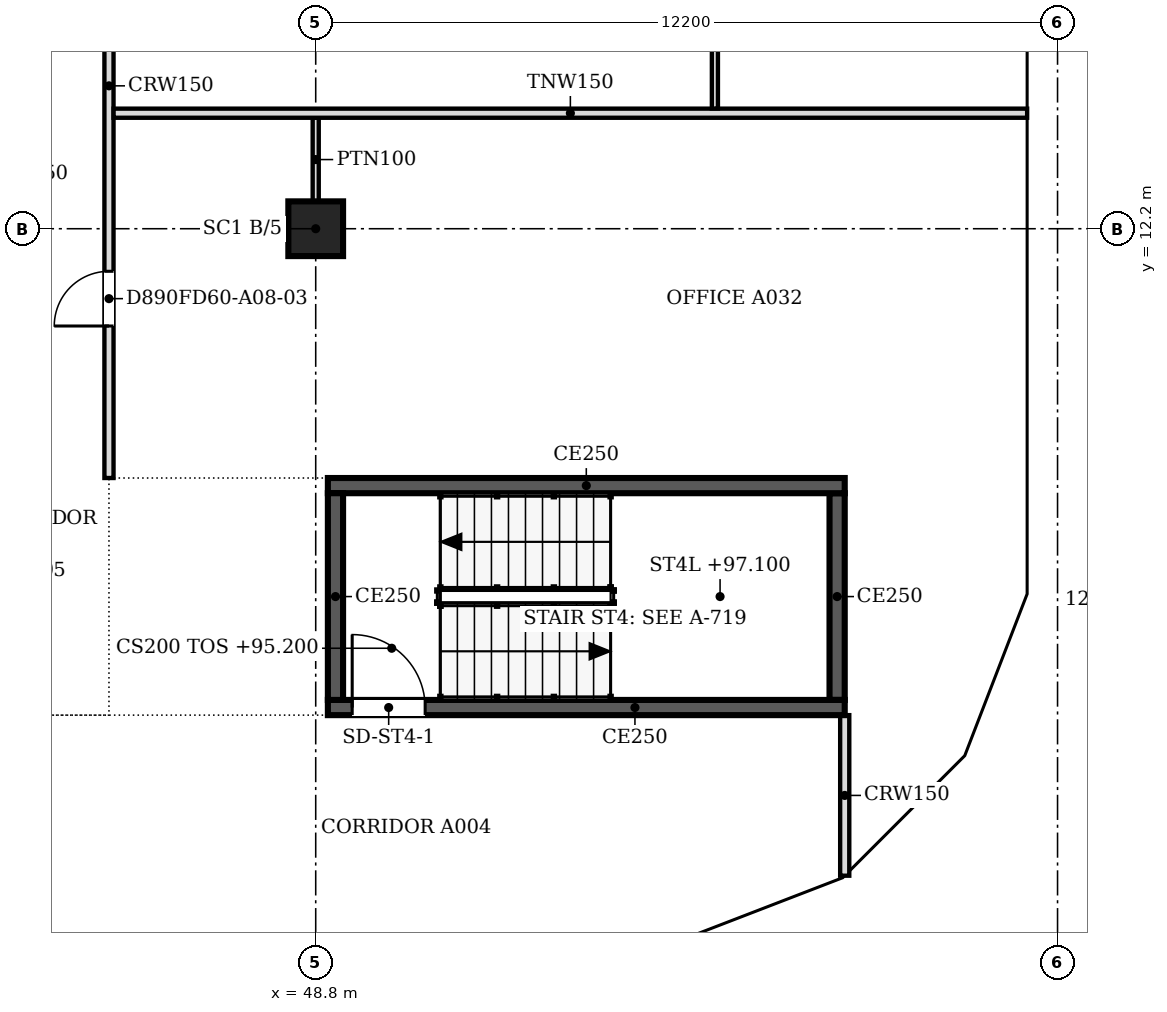
"""IFC4 building model, lengths in metres.
Left out: names, types, materials, properties, quantities, classifications, styles, units other than length and angle.
Written with IfcOpenShell. Run it as: python <this file> out.ifc"""

import sys

from ifc_helpers import new_model, si_unit, direction, frame, frame_2d, origin, origin_2d, place, context, subcontext, project, spatial, polyline, rectangle, outline, extrude, faceted_brep, source, transform, mapped, element, fill, save


model = new_model("IFC4")
c1 = context("Model", 3, precision=1e-05, world=origin(), true_north=direction((0.0, 1.0)))
c2 = subcontext(c1, "Body", "Model", "MODEL_VIEW")
j1 = project(units=[si_unit("LENGTHUNIT", "METRE"), si_unit("PLANEANGLEUNIT", "RADIAN")], contexts=[c1])
p1 = place(None, origin())
s1 = spatial("IfcSite", under=j1, at=p1, CompositionType="ELEMENT")
p2 = place(p1, origin())
s2 = spatial("IfcBuilding", under=s1, at=p2, CompositionType="ELEMENT")
p3 = place(p2, frame((0.0, 0.0, 95.2)))
s3 = spatial("IfcBuildingStorey", under=s2, at=p3, CompositionType="ELEMENT", Elevation=95.2)
p4 = place(p3, frame((48.8, 12.2, 0.0), z_axis=(0.0, 0.0, 1.0), x_axis=(1.0, 0.0, 0.0)))
e1 = element("IfcColumn", 1, at=p4, inside=s3, PredefinedType="COLUMN", context=c2, shape_type="SweptSolid", body=[
    extrude(rectangle(XDim=0.9, YDim=0.9, at=origin_2d()), origin(), (0.0, 0.0, 1.0), 3.6),
])
m1 = source(origin(), c2, "Body", "Brep", [
    faceted_brep([(2.95, -0.25, 0.0), (3.003, -0.25, 0.068), (3.003, -0.25, 7.532), (2.95, -0.25, 7.6), (0.0, -0.25, 3.8), (0.047, 0.25, 3.86), (2.898, 0.25, 7.532), (2.898, 0.25, 0.068), (0.047, 0.25, 3.74), (2.95, 0.0, 0.0), (2.95, 0.0, 7.6), (0.0, 0.0, 3.8)], [[[0, 1, 2, 3, 4]], [[5, 6, 7, 8]], [[1, 0, 9]], [[10, 3, 2]], [[6, 5, 11, 4, 3, 10]], [[8, 7, 9, 0, 4, 11]], [[8, 11, 5]], [[1, 9, 7, 6, 10, 2]]]),
])
p5 = place(p3, frame((54.854, 0.25, -3.8), z_axis=(0.0, 0.0, 1.0), x_axis=(0.932970071518, 0.359953949349, 0.0)))
e2 = element("IfcWall", 2, at=p5, inside=s3, PredefinedType="SOLIDWALL", context=c2, shape_type="MappedRepresentation", body=[
    mapped(m1, transform((0.0, 0.0, 0.0), scale=1.0)),
])
m2 = source(origin(), c2, "Body", "SweptSolid", [
    extrude(outline(polyline([(2.75, 6.935), (0.316, 3.8), (2.75, 0.665), (2.75, 6.935)])), frame((0.0, 0.26, 0.0), z_axis=(0.0, -1.0, 0.0), x_axis=(1.0, 0.0, 0.0)), (0.0, 0.0, 1.0), 0.52),
])
p6 = place(p5, origin())
e3 = element("IfcOpeningElement", 3, at=p6, cuts=e2, PredefinedType="OPENING", context=c2, shape_type="MappedRepresentation", body=[
    mapped(m2, transform((0.0, 0.0, 0.0), scale=1.0)),
])
m3 = source(origin(), c2, "Body", "Brep", [
    faceted_brep([(0.053, -0.25, 0.0), (2.997, -0.25, 3.8), (0.053, -0.25, 7.6), (0.0, -0.25, 7.532), (0.0, -0.25, 0.068), (0.106, 0.25, 7.532), (2.944, 0.25, 3.868), (2.944, 0.25, 3.732), (0.106, 0.25, 0.068), (2.997, 0.0, 3.8), (0.053, 0.0, 0.0), (0.053, 0.0, 7.6)], [[[0, 1, 2, 3, 4]], [[5, 6, 7, 8]], [[8, 7, 9, 1, 0, 10]], [[6, 5, 11, 2, 1, 9]], [[3, 2, 11]], [[10, 0, 4]], [[8, 10, 4, 3, 11, 5]], [[9, 7, 6]]]),
])
p7 = place(p3, frame((57.569, 1.274, -3.8), z_axis=(0.0, 0.0, 1.0), x_axis=(0.707066050402, 0.707147509625, 0.0)))
e4 = element("IfcWall", 4, at=p7, inside=s3, PredefinedType="SOLIDWALL", context=c2, shape_type="MappedRepresentation", body=[
    mapped(m3, transform((0.0, 0.0, 0.0), scale=1.0)),
])
m4 = source(origin(), c2, "Body", "SweptSolid", [
    extrude(outline(polyline([(0.253, 0.667), (2.681, 3.8), (0.253, 6.934), (0.253, 0.667)])), frame((0.0, 0.26, 0.0), z_axis=(0.0, -1.0, 0.0), x_axis=(1.0, 0.0, 0.0)), (0.0, 0.0, 1.0), 0.52),
])
p8 = place(p7, origin())
e5 = element("IfcOpeningElement", 5, at=p8, cuts=e4, PredefinedType="OPENING", context=c2, shape_type="MappedRepresentation", body=[
    mapped(m4, transform((0.0, 0.0, 0.0), scale=1.0)),
])
m5 = source(origin(), c2, "Body", "Brep", [
    faceted_brep([(2.95, -0.25, 0.0), (2.997, -0.25, 0.059), (2.997, -0.25, 7.541), (2.95, -0.25, 7.6), (0.0, -0.25, 3.8), (0.053, 0.25, 3.868), (2.904, 0.25, 7.54), (2.904, 0.25, 0.06), (0.053, 0.25, 3.732), (2.95, 0.0, 0.0), (2.95, 0.0, 7.6), (0.0, 0.0, 3.8)], [[[0, 1, 2, 3, 4]], [[5, 6, 7, 8]], [[1, 0, 9]], [[10, 3, 2]], [[6, 5, 11, 4, 3, 10]], [[8, 7, 9, 0, 4, 11]], [[8, 11, 5]], [[1, 9, 7, 6, 10, 2]]]),
])
p9 = place(p3, frame((59.688, 3.394, -3.8), z_axis=(0.0, 0.0, 1.0), x_axis=(0.359972353723, 0.932962970624, 0.0)))
e6 = element("IfcWall", 6, at=p9, inside=s3, PredefinedType="SOLIDWALL", context=c2, shape_type="MappedRepresentation", body=[
    mapped(m5, transform((0.0, 0.0, 0.0), scale=1.0)),
])
p10 = place(p9, origin())
e7 = element("IfcOpeningElement", 7, at=p10, cuts=e6, PredefinedType="OPENING", context=c2, shape_type="MappedRepresentation", body=[
    mapped(m2, transform((0.0, 0.0, 0.0), scale=1.0)),
])
m6 = source(origin(), c2, "Body", "Brep", [
    faceted_brep([(0.047, -0.25, 0.0), (3.05, -0.25, 3.8), (0.047, -0.25, 7.6), (0.0, -0.25, 7.54), (0.0, -0.25, 0.06), (0.093, 0.25, 7.541), (3.05, 0.25, 3.8), (0.093, 0.25, 0.059), (0.047, 0.0, 0.0), (0.047, 0.0, 7.6)], [[[0, 1, 2, 3, 4]], [[5, 6, 7]], [[7, 6, 1, 0, 8]], [[6, 5, 9, 2, 1]], [[3, 2, 9]], [[8, 0, 4]], [[7, 8, 4, 3, 9, 5]]]),
])
p11 = place(p3, frame((60.75, 6.1, -3.8), z_axis=(0.0, 0.0, 1.0), x_axis=(0.0, 1.0, 0.0)))
e8 = element("IfcWall", 8, at=p11, inside=s3, PredefinedType="SOLIDWALL", context=c2, shape_type="MappedRepresentation", body=[
    mapped(m6, transform((0.0, 0.0, 0.0), scale=1.0)),
])
m7 = source(origin(), c2, "Body", "SweptSolid", [
    extrude(outline(polyline([(0.247, 0.656), (2.731, 3.8), (0.247, 6.944), (0.247, 0.656)])), frame((0.0, 0.26, 0.0), z_axis=(0.0, -1.0, 0.0), x_axis=(1.0, 0.0, 0.0)), (0.0, 0.0, 1.0), 0.52),
])
p12 = place(p11, origin())
e9 = element("IfcOpeningElement", 9, at=p12, cuts=e8, PredefinedType="OPENING", context=c2, shape_type="MappedRepresentation", body=[
    mapped(m7, transform((0.0, 0.0, 0.0), scale=1.0)),
])
m8 = source(origin(), c2, "Body", "SweptSolid", [
    extrude(outline(polyline([(3.05, 0.0), (6.1, 3.8), (3.05, 7.6), (0.0, 3.8), (3.05, 0.0)])), frame((0.0, 0.25, 0.0), z_axis=(0.0, -1.0, 0.0), x_axis=(1.0, 0.0, 0.0)), (0.0, 0.0, 1.0), 0.5),
])
p13 = place(p3, frame((60.75, 9.15, -3.8), z_axis=(0.0, 0.0, 1.0), x_axis=(0.0, 1.0, 0.0)))
e10 = element("IfcWall", 10, at=p13, inside=s3, PredefinedType="SOLIDWALL", context=c2, shape_type="MappedRepresentation", body=[
    mapped(m8, transform((0.0, 0.0, 0.0), scale=1.0)),
])
m9 = source(origin(), c2, "Body", "SweptSolid", [
    extrude(outline(polyline([(3.05, 0.399), (5.78, 3.8), (3.05, 7.201), (0.321, 3.8), (3.05, 0.399)])), frame((0.0, 0.26, 0.0), z_axis=(0.0, -1.0, 0.0), x_axis=(1.0, 0.0, 0.0)), (0.0, 0.0, 1.0), 0.52),
])
p14 = place(p13, origin())
e11 = element("IfcOpeningElement", 11, at=p14, cuts=e10, PredefinedType="OPENING", context=c2, shape_type="MappedRepresentation", body=[
    mapped(m9, transform((0.0, 0.0, 0.0), scale=1.0)),
])
p15 = place(p2, frame((0.0, 0.0, 99.0)))
s4 = spatial("IfcBuildingStorey", under=s2, at=p15, CompositionType="ELEMENT", Elevation=99.0)
m10 = source(origin(), c2, "Body", "Brep", [
    faceted_brep([(0.047, -0.25, 0.0), (2.997, -0.25, 3.8), (0.047, -0.25, 7.6), (0.0, -0.25, 7.541), (0.0, -0.25, 0.059), (0.093, 0.25, 7.54), (2.944, 0.25, 3.868), (2.944, 0.25, 3.732), (0.093, 0.25, 0.06), (2.997, 0.0, 3.8), (0.047, 0.0, 0.0), (0.047, 0.0, 7.6)], [[[0, 1, 2, 3, 4]], [[5, 6, 7, 8]], [[8, 7, 9, 1, 0, 10]], [[6, 5, 11, 2, 1, 9]], [[3, 2, 11]], [[10, 0, 4]], [[8, 10, 4, 3, 11, 5]], [[9, 7, 6]]]),
])
p16 = place(p15, frame((54.81, 0.233, -3.8), z_axis=(0.0, 0.0, 1.0), x_axis=(0.932990326376, 0.359901446078, 0.0)))
e12 = element("IfcWall", 12, at=p16, inside=s4, PredefinedType="SOLIDWALL", context=c2, shape_type="MappedRepresentation", body=[
    mapped(m10, transform((0.0, 0.0, 0.0), scale=1.0)),
])
m11 = source(origin(), c2, "Body", "SweptSolid", [
    extrude(outline(polyline([(0.247, 0.665), (2.681, 3.8), (0.247, 6.935), (0.247, 0.665)])), frame((0.0, 0.26, 0.0), z_axis=(0.0, -1.0, 0.0), x_axis=(1.0, 0.0, 0.0)), (0.0, 0.0, 1.0), 0.52),
])
p17 = place(p16, origin())
e13 = element("IfcOpeningElement", 13, at=p17, cuts=e12, PredefinedType="OPENING", context=c2, shape_type="MappedRepresentation", body=[
    mapped(m11, transform((0.0, 0.0, 0.0), scale=1.0)),
])
m12 = source(origin(), c2, "Body", "Brep", [
    faceted_brep([(2.944, -0.25, 0.0), (2.997, -0.25, 0.068), (2.997, -0.25, 7.532), (2.944, -0.25, 7.6), (0.0, -0.25, 3.8), (0.053, 0.25, 3.868), (2.891, 0.25, 7.532), (2.891, 0.25, 0.068), (0.053, 0.25, 3.732), (2.944, 0.0, 0.0), (2.944, 0.0, 7.6), (0.0, 0.0, 3.8)], [[[0, 1, 2, 3, 4]], [[5, 6, 7, 8]], [[1, 0, 9]], [[10, 3, 2]], [[6, 5, 11, 4, 3, 10]], [[8, 7, 9, 0, 4, 11]], [[8, 11, 5]], [[1, 9, 7, 6, 10, 2]]]),
])
p18 = place(p15, frame((57.606, 1.312, -3.8), z_axis=(0.0, 0.0, 1.0), x_axis=(0.707147509625, 0.707066050402, 0.0)))
e14 = element("IfcWall", 14, at=p18, inside=s4, PredefinedType="SOLIDWALL", context=c2, shape_type="MappedRepresentation", body=[
    mapped(m12, transform((0.0, 0.0, 0.0), scale=1.0)),
])
m13 = source(origin(), c2, "Body", "SweptSolid", [
    extrude(outline(polyline([(2.744, 6.934), (0.316, 3.8), (2.744, 0.666), (2.744, 6.934)])), frame((0.0, 0.26, 0.0), z_axis=(0.0, -1.0, 0.0), x_axis=(1.0, 0.0, 0.0)), (0.0, 0.0, 1.0), 0.52),
])
p19 = place(p18, origin())
e15 = element("IfcOpeningElement", 15, at=p19, cuts=e14, PredefinedType="OPENING", context=c2, shape_type="MappedRepresentation", body=[
    mapped(m13, transform((0.0, 0.0, 0.0), scale=1.0)),
])
m14 = source(origin(), c2, "Body", "Brep", [
    faceted_brep([(0.053, -0.25, 0.0), (3.003, -0.25, 3.8), (0.053, -0.25, 7.6), (0.0, -0.25, 7.532), (0.0, -0.25, 0.068), (0.106, 0.25, 7.532), (2.957, 0.25, 3.86), (2.957, 0.25, 3.74), (0.106, 0.25, 0.068), (3.003, 0.0, 3.8), (0.053, 0.0, 0.0), (0.053, 0.0, 7.6)], [[[0, 1, 2, 3, 4]], [[5, 6, 7, 8]], [[8, 7, 9, 1, 0, 10]], [[6, 5, 11, 2, 1, 9]], [[3, 2, 11]], [[10, 0, 4]], [[8, 10, 4, 3, 11, 5]], [[9, 7, 6]]]),
])
p20 = place(p15, frame((59.669, 3.344, -3.8), z_axis=(0.0, 0.0, 1.0), x_axis=(0.35992665181, 0.932980602862, 0.0)))
e16 = element("IfcWall", 16, at=p20, inside=s4, PredefinedType="SOLIDWALL", context=c2, shape_type="MappedRepresentation", body=[
    mapped(m14, transform((0.0, 0.0, 0.0), scale=1.0)),
])
m15 = source(origin(), c2, "Body", "SweptSolid", [
    extrude(outline(polyline([(0.253, 0.665), (2.687, 3.8), (0.253, 6.935), (0.253, 0.665)])), frame((0.0, 0.26, 0.0), z_axis=(0.0, -1.0, 0.0), x_axis=(1.0, 0.0, 0.0)), (0.0, 0.0, 1.0), 0.52),
])
p21 = place(p20, origin())
e17 = element("IfcOpeningElement", 17, at=p21, cuts=e16, PredefinedType="OPENING", context=c2, shape_type="MappedRepresentation", body=[
    mapped(m15, transform((0.0, 0.0, 0.0), scale=1.0)),
])
m16 = source(origin(), c2, "Body", "Brep", [
    faceted_brep([(3.003, -0.25, 0.0), (6.053, -0.25, 3.8), (3.003, -0.25, 7.6), (0.0, -0.25, 3.8), (0.047, 0.25, 3.859), (3.003, 0.25, 7.6), (6.053, 0.25, 3.8), (3.003, 0.25, 0.0), (0.047, 0.25, 3.741), (0.0, 0.0, 3.8)], [[[0, 1, 2, 3]], [[4, 5, 6, 7, 8]], [[7, 6, 1, 0]], [[6, 5, 2, 1]], [[5, 4, 9, 3, 2]], [[8, 7, 0, 3, 9]], [[8, 9, 4]]]),
])
p22 = place(p15, frame((60.75, 6.146, -3.8), z_axis=(0.0, 0.0, 1.0), x_axis=(0.0, 1.0, 0.0)))
e18 = element("IfcWall", 18, at=p22, inside=s4, PredefinedType="SOLIDWALL", context=c2, shape_type="MappedRepresentation", body=[
    mapped(m16, transform((0.0, 0.0, 0.0), scale=1.0)),
])
m17 = source(origin(), c2, "Body", "SweptSolid", [
    extrude(outline(polyline([(3.005, 0.401), (5.733, 3.8), (3.005, 7.199), (0.319, 3.8), (3.005, 0.401)])), frame((0.0, 0.26, 0.0), z_axis=(0.0, -1.0, 0.0), x_axis=(1.0, 0.0, 0.0)), (0.0, 0.0, 1.0), 0.52),
])
p23 = place(p22, origin())
e19 = element("IfcOpeningElement", 19, at=p23, cuts=e18, PredefinedType="OPENING", context=c2, shape_type="MappedRepresentation", body=[
    mapped(m17, transform((0.0, 0.0, 0.0), scale=1.0)),
])
p24 = place(p15, frame((60.75, 12.2, -3.8), z_axis=(0.0, 0.0, 1.0), x_axis=(0.0, 1.0, 0.0)))
e20 = element("IfcWall", 20, at=p24, inside=s4, PredefinedType="SOLIDWALL", context=c2, shape_type="MappedRepresentation", body=[
    mapped(m8, transform((0.0, 0.0, 0.0), scale=1.0)),
])
p25 = place(p24, origin())
e21 = element("IfcOpeningElement", 21, at=p25, cuts=e20, PredefinedType="OPENING", context=c2, shape_type="MappedRepresentation", body=[
    mapped(m9, transform((0.0, 0.0, 0.0), scale=1.0)),
])
p26 = place(p3, frame((57.5, 4.325, 0.0), z_axis=(0.0, 0.0, 1.0), x_axis=(-1.0, 0.0, 0.0)))
e22 = element("IfcWall", 22, at=p26, inside=s3, PredefinedType="SOLIDWALL", context=c2, shape_type="SweptSolid", body=[
    extrude(rectangle(XDim=8.5, YDim=0.25, at=frame_2d((4.25, 0.0))), origin(), (0.0, 0.0, 1.0), 3.8),
])
m18 = source(origin(), c2, "Body", "SweptSolid", [
    extrude(rectangle(XDim=1.2, YDim=2.1, at=frame_2d((0.6, 1.05))), frame((0.0, 0.135, 0.0), z_axis=(0.0, -1.0, 0.0), x_axis=(1.0, 0.0, 0.0)), (0.0, 0.0, 1.0), 0.27),
])
p27 = place(p26, frame((6.9, 0.0, 0.0)))
e23 = element("IfcOpeningElement", 23, at=p27, cuts=e22, PredefinedType="OPENING", context=c2, shape_type="MappedRepresentation", body=[
    mapped(m18, transform((0.0, 0.0, 0.0), scale=1.0)),
])
p28 = place(p3, frame((49.125, 4.45, 0.0), z_axis=(0.0, 0.0, 1.0), x_axis=(0.0, 1.0, 0.0)))
e24 = element("IfcWall", 24, at=p28, inside=s3, PredefinedType="SOLIDWALL", context=c2, shape_type="SweptSolid", body=[
    extrude(rectangle(XDim=3.4, YDim=0.25, at=frame_2d((1.7, 0.0))), origin(), (0.0, 0.0, 1.0), 3.8),
])
p29 = place(p3, frame((49.0, 7.975, 0.0), z_axis=(0.0, 0.0, 1.0), x_axis=(1.0, 0.0, 0.0)))
e25 = element("IfcWall", 25, at=p29, inside=s3, PredefinedType="SOLIDWALL", context=c2, shape_type="SweptSolid", body=[
    extrude(rectangle(XDim=8.5, YDim=0.25, at=frame_2d((4.25, 0.0))), origin(), (0.0, 0.0, 1.0), 3.8),
])
p30 = place(p3, frame((57.375, 7.85, 0.0), z_axis=(0.0, 0.0, 1.0), x_axis=(0.0, -1.0, 0.0)))
e26 = element("IfcWall", 26, at=p30, inside=s3, PredefinedType="SOLIDWALL", context=c2, shape_type="SweptSolid", body=[
    extrude(rectangle(XDim=3.4, YDim=0.25, at=frame_2d((1.7, 0.0))), origin(), (0.0, 0.0, 1.0), 3.8),
])
p31 = place(p3, frame((57.5, 1.559, 0.0), z_axis=(0.0, 0.0, 1.0), x_axis=(0.0, 1.0, 0.0)))
e27 = element("IfcWall", 27, at=p31, inside=s3, PredefinedType="PARTITIONING", context=c2, shape_type="SweptSolid", body=[
    extrude(rectangle(XDim=2.641, YDim=0.15, at=frame_2d((1.32, 0.0))), origin(), (0.0, 0.0, 1.0), 3.067),
])
p32 = place(p3, frame((45.4, 21.924, 0.0), z_axis=(0.0, 0.0, 1.0), x_axis=(0.0, -1.0, 0.0)))
e28 = element("IfcWall", 28, at=p32, inside=s3, PredefinedType="PARTITIONING", context=c2, shape_type="SweptSolid", body=[
    extrude(rectangle(XDim=13.824, YDim=0.15, at=frame_2d((6.912, 0.0))), origin(), (0.0, 0.0, 1.0), 3.067),
])
m19 = source(origin(), c2, "Body", "SweptSolid", [
    extrude(rectangle(XDim=0.9, YDim=2.1, at=frame_2d((0.45, 1.05))), frame((0.0, 0.085, 0.0), z_axis=(0.0, -1.0, 0.0), x_axis=(1.0, 0.0, 0.0)), (0.0, 0.0, 1.0), 0.17),
])
p33 = place(p32, frame((10.424, 0.0, 0.0)))
e29 = element("IfcOpeningElement", 29, at=p33, cuts=e28, PredefinedType="OPENING", context=c2, shape_type="MappedRepresentation", body=[
    mapped(m19, transform((0.0, 0.0, 0.0), scale=1.0)),
])
p34 = place(p32, frame((3.424, 0.0, 0.0)))
e30 = element("IfcOpeningElement", 30, at=p34, cuts=e28, PredefinedType="OPENING", context=c2, shape_type="MappedRepresentation", body=[
    mapped(m19, transform((0.0, 0.0, 0.0), scale=1.0)),
])
p35 = place(p3, frame((48.8, 12.65, 0.0), z_axis=(0.0, 0.0, 1.0), x_axis=(0.0, 1.0, 0.0)))
e31 = element("IfcWall", 31, at=p35, inside=s3, PredefinedType="PARTITIONING", context=c2, shape_type="SweptSolid", body=[
    extrude(rectangle(XDim=1.375, YDim=0.1, at=frame_2d((0.688, 0.0))), origin(), (0.0, 0.0, 1.0), 3.067),
])
p36 = place(p3, frame((45.476, 14.1, 0.0), z_axis=(0.0, 0.0, 1.0), x_axis=(1.0, 0.0, 0.0)))
e32 = element("IfcWall", 32, at=p36, inside=s3, PredefinedType="PARTITIONING", context=c2, shape_type="SweptSolid", body=[
    extrude(rectangle(XDim=15.024, YDim=0.15, at=frame_2d((7.512, 0.0))), origin(), (0.0, 0.0, 1.0), 3.067),
])
p37 = place(p3, frame((55.365, 21.924, 0.0), z_axis=(0.0, 0.0, 1.0), x_axis=(0.0, -1.0, 0.0)))
e33 = element("IfcWall", 33, at=p37, inside=s3, PredefinedType="PARTITIONING", context=c2, shape_type="SweptSolid", body=[
    extrude(rectangle(XDim=7.748, YDim=0.1, at=frame_2d((3.874, 0.0))), origin(), (0.0, 0.0, 1.0), 3.067),
])
m20 = source(origin(), c2, "Body", "SweptSolid", [
    extrude(rectangle(XDim=0.9, YDim=2.1, at=frame_2d((0.45, 1.05))), frame((0.0, 0.06, 0.0), z_axis=(0.0, -1.0, 0.0), x_axis=(1.0, 0.0, 0.0)), (0.0, 0.0, 1.0), 0.12),
])
p38 = place(p37, frame((3.448, 0.0, 0.0)))
e34 = element("IfcOpeningElement", 34, at=p38, cuts=e33, PredefinedType="OPENING", context=c2, shape_type="MappedRepresentation", body=[
    mapped(m20, transform((0.0, 0.0, 0.0), scale=1.0)),
])
m21 = source(origin(), c2, "Body", "SweptSolid", [
    extrude(rectangle(XDim=1.2, YDim=2.1, at=frame_2d((0.6, 1.05))), frame((0.0, 0.025, 0.0), z_axis=(0.0, -1.0, 0.0), x_axis=(1.0, 0.0, 0.0)), (0.0, 0.0, 1.0), 0.05),
])
p39 = place(p27, origin())
e35 = element("IfcDoor", 35, at=p39, inside=s3, OperationType="SINGLE_SWING_RIGHT", PredefinedType="DOOR", context=c2, shape_type="MappedRepresentation", body=[
    mapped(m21, transform((0.0, 0.0, 0.0), scale=1.0)),
])
fill(e23, e35)
m22 = source(origin(), c2, "Body", "SweptSolid", [
    extrude(rectangle(XDim=0.9, YDim=2.1, at=frame_2d((0.45, 1.05))), frame((0.0, 0.025, 0.0), z_axis=(0.0, -1.0, 0.0), x_axis=(1.0, 0.0, 0.0)), (0.0, 0.0, 1.0), 0.05),
])
p40 = place(p33, origin())
e36 = element("IfcDoor", 36, at=p40, inside=s3, OperationType="SINGLE_SWING_RIGHT", PredefinedType="DOOR", context=c2, shape_type="MappedRepresentation", body=[
    mapped(m22, transform((0.0, 0.0, 0.0), scale=1.0)),
])
fill(e29, e36)
save(model, sys.argv[1])
